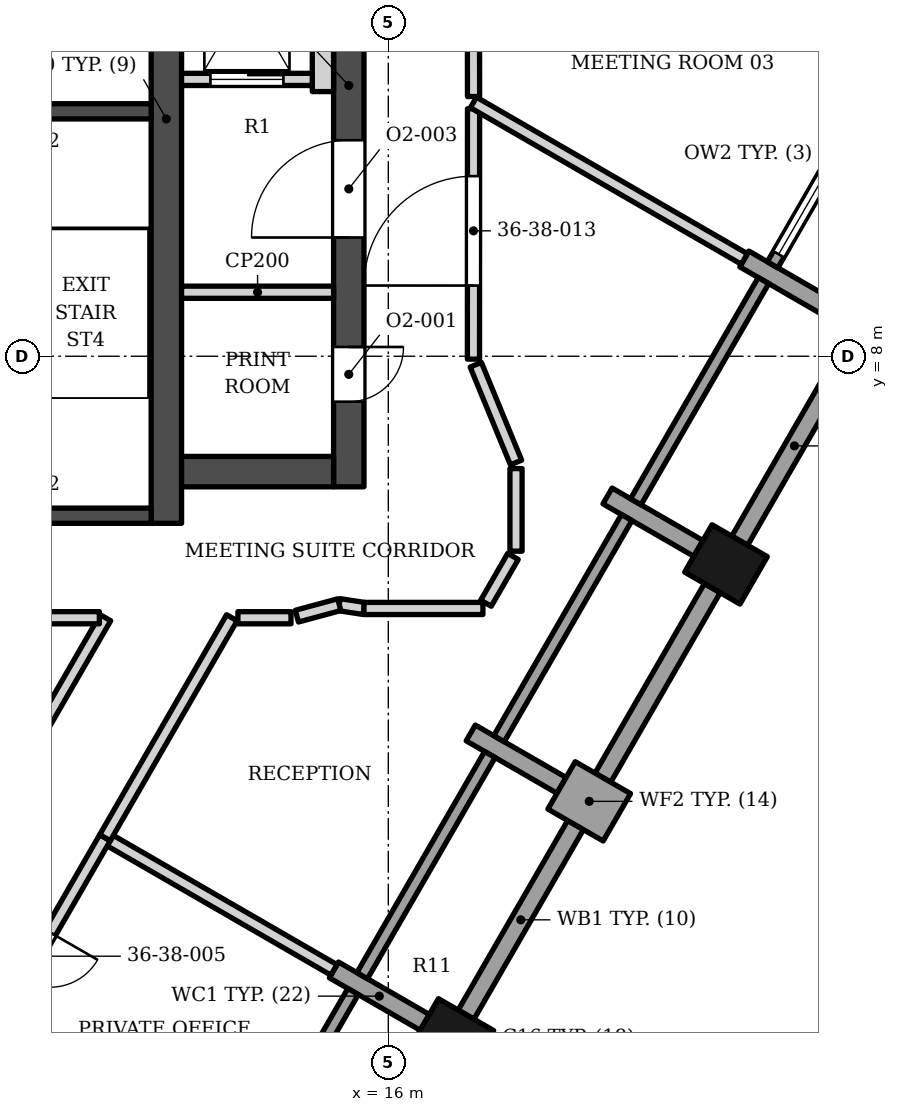
"""IFC4 building model, lengths in metres.
Left out: names, types, materials, properties, quantities, classifications, styles, units other than length and angle.
Written with IfcOpenShell. Run it as: python <this file> out.ifc"""

import sys

from ifc_helpers import new_model, si_unit, direction, frame, frame_2d, origin, origin_2d, place, context, subcontext, project, spatial, rectangle, extrude, element, fill, save


model = new_model("IFC4")
c1 = context("Model", 3, precision=1e-05, world=origin(), true_north=direction((0.0, 1.0)))
c2 = subcontext(c1, "Body", "Model", "MODEL_VIEW")
j1 = project(units=[si_unit("LENGTHUNIT", "METRE"), si_unit("PLANEANGLEUNIT", "RADIAN")], contexts=[c1])
p1 = place(None, origin())
s1 = spatial("IfcSite", under=j1, at=p1, CompositionType="ELEMENT")
p2 = place(p1, origin())
s2 = spatial("IfcBuilding", under=s1, at=p2, CompositionType="ELEMENT")
p3 = place(p2, frame((0.0, 0.0, 156.3)))
s3 = spatial("IfcBuildingStorey", under=s2, at=p3, CompositionType="ELEMENT", Elevation=156.3)
p4 = place(p3, frame((12.35, 5.253, 0.0), z_axis=(0.0, 0.0, 1.0), x_axis=(0.0, 1.0, 0.0)))
e1 = element("IfcWall", 1, at=p4, inside=s3, PredefinedType="SHEAR", context=c2, shape_type="SweptSolid", body=[
    extrude(rectangle(XDim=13.3, YDim=0.5, at=frame_2d((6.65, 0.0))), origin(), (0.0, 0.0, 1.0), 3.9),
])
for number, where, z_axis, x_axis in (
    (2, (8.35, 12.028, 0.0), (0.0, 0.0, 1.0), (1.0, 0.0, 0.0)),
    (3, (8.35, 5.378, 0.0), (0.0, 0.0, 1.0), (1.0, 0.0, 0.0)),
):
    element("IfcWall", number, at=place(p3, frame(where, z_axis=z_axis, x_axis=x_axis)), inside=s3, PredefinedType="SHEAR", context=c2, shape_type="SweptSolid", body=[
        extrude(rectangle(XDim=3.75, YDim=0.25, at=frame_2d((1.875, 0.0))), origin(), (0.0, 0.0, 1.0), 3.9),
    ])
p5 = place(p3, frame((12.6, 6.103, 0.0), z_axis=(0.0, 0.0, 1.0), x_axis=(1.0, 0.0, 0.0)))
e4 = element("IfcWall", 4, at=p5, inside=s3, PredefinedType="SHEAR", context=c2, shape_type="SweptSolid", body=[
    extrude(rectangle(XDim=2.5, YDim=0.5, at=frame_2d((1.25, 0.0))), origin(), (0.0, 0.0, 1.0), 3.9),
])
p6 = place(p3, frame((15.35, 5.853, 0.0), z_axis=(0.0, 0.0, 1.0), x_axis=(0.0, 1.0, 0.0)))
e5 = element("IfcWall", 5, at=p6, inside=s3, PredefinedType="SHEAR", context=c2, shape_type="SweptSolid", body=[
    extrude(rectangle(XDim=13.2, YDim=0.5, at=frame_2d((6.6, 0.0))), origin(), (0.0, 0.0, 1.0), 3.9),
])
p7 = place(p6, frame((4.1, 0.0, 0.0)))
e6 = element("IfcOpeningElement", 6, at=p7, cuts=e5, PredefinedType="OPENING", context=c2, shape_type="SweptSolid", body=[
    extrude(rectangle(XDim=1.6, YDim=2.1, at=frame_2d((0.8, 1.05))), frame((0.0, 0.26, 0.0), z_axis=(0.0, -1.0, 0.0), x_axis=(1.0, 0.0, 0.0)), (0.0, 0.0, 1.0), 0.52),
])
p8 = place(p6, frame((1.4, 0.0, 0.0)))
e7 = element("IfcOpeningElement", 7, at=p8, cuts=e5, PredefinedType="OPENING", context=c2, shape_type="SweptSolid", body=[
    extrude(rectangle(XDim=0.9, YDim=2.1, at=frame_2d((0.45, 1.05))), frame((0.0, 0.26, 0.0), z_axis=(0.0, -1.0, 0.0), x_axis=(1.0, 0.0, 0.0)), (0.0, 0.0, 1.0), 0.52),
])
p9 = place(p6, frame((10.15, 0.0, 0.0)))
e8 = element("IfcOpeningElement", 8, at=p9, cuts=e5, PredefinedType="OPENING", context=c2, shape_type="SweptSolid", body=[
    extrude(rectangle(XDim=0.9, YDim=2.1, at=frame_2d((0.45, 1.05))), frame((0.0, 0.26, 0.0), z_axis=(0.0, -1.0, 0.0), x_axis=(1.0, 0.0, 0.0)), (0.0, 0.0, 1.0), 0.52),
])
for number, where, z_axis, x_axis in (
    (9, (17.054, -3.217, 0.0), (0.0, 0.0, 1.0), (0.5, 0.866, 0.0)),
    (10, (21.554, 4.577, 0.0), (0.0, 0.0, 1.0), (0.5, 0.866, 0.0)),
):
    element("IfcColumn", number, at=place(p3, frame(where, z_axis=z_axis, x_axis=x_axis)), inside=s3, PredefinedType="COLUMN", context=c2, shape_type="SweptSolid", body=[
        extrude(rectangle(XDim=0.9, YDim=1.05, at=origin_2d()), origin(), (0.0, 0.0, 1.0), 3.9),
    ])
p10 = place(p3, frame((16.599, -2.954, 0.0), z_axis=(0.0, 0.0, 1.0), x_axis=(-0.86597814115, 0.500081852351, 0.0)))
e11 = element("IfcWall", 11, at=p10, inside=s3, PredefinedType="SOLIDWALL", context=c2, shape_type="SweptSolid", body=[
    extrude(rectangle(XDim=1.725, YDim=0.3, at=frame_2d((0.862, 0.0))), origin(), (0.0, 0.0, 1.0), 3.0),
])
p11 = place(p3, frame((19.759, 0.418, 0.0), z_axis=(0.0, 0.0, 1.0), x_axis=(-0.86592997719, 0.500165247297, 0.0)))
e12 = element("IfcWall", 12, at=p11, inside=s3, PredefinedType="SOLIDWALL", context=c2, shape_type="SweptSolid", body=[
    extrude(rectangle(XDim=1.05, YDim=0.9, at=frame_2d((0.525, 0.0))), origin(), (0.0, 0.0, 1.0), 3.0),
])
p12 = place(p3, frame((18.85, 0.943, 0.0), z_axis=(0.0, 0.0, 1.0), x_axis=(-0.866074815912, 0.499914405916, 0.0)))
e13 = element("IfcWall", 13, at=p12, inside=s3, PredefinedType="SOLIDWALL", context=c2, shape_type="SweptSolid", body=[
    extrude(rectangle(XDim=1.725, YDim=0.3, at=frame_2d((0.862, 0.0))), origin(), (0.0, 0.0, 1.0), 3.0),
])
p13 = place(p3, frame((21.1, 4.84, 0.0), z_axis=(0.0, 0.0, 1.0), x_axis=(-0.866013532718, 0.500020560727, 0.0)))
e14 = element("IfcWall", 14, at=p13, inside=s3, PredefinedType="SOLIDWALL", context=c2, shape_type="SweptSolid", body=[
    extrude(rectangle(XDim=1.725, YDim=0.3, at=frame_2d((0.863, 0.0))), origin(), (0.0, 0.0, 1.0), 2.95),
])
p14 = place(p3, frame((23.35, 8.737, 0.0), z_axis=(0.0, 0.0, 1.0), x_axis=(-0.866013532718, 0.500020560727, 0.0)))
e15 = element("IfcWall", 15, at=p14, inside=s3, PredefinedType="SOLIDWALL", context=c2, shape_type="SweptSolid", body=[
    extrude(rectangle(XDim=1.725, YDim=0.3, at=frame_2d((0.863, 0.0))), origin(), (0.0, 0.0, 1.0), 3.0),
])
p15 = place(p3, frame((13.32, -6.084, 0.0), z_axis=(0.0, 0.0, 1.0), x_axis=(0.500027713859, 0.866009402589, 0.0)))
e16 = element("IfcWall", 16, at=p15, inside=s3, PredefinedType="ELEMENTEDWALL", context=c2, shape_type="SweptSolid", body=[
    extrude(rectangle(XDim=4.2, YDim=0.2, at=frame_2d((2.1, 0.0))), origin(), (0.0, 0.0, 1.0), 3.0),
])
p16 = place(p3, frame((17.279, -2.827, 0.0), z_axis=(0.0, 0.0, 1.0), x_axis=(0.500012057535, 0.866018442252, 0.0)))
e17 = element("IfcWall", 17, at=p16, inside=s3, PredefinedType="SOLIDWALL", context=c2, shape_type="SweptSolid", body=[
    extrude(rectangle(XDim=3.6, YDim=0.3, at=frame_2d((1.8, 0.0))), origin(), (0.0, 0.0, 1.0), 3.0),
])
p17 = place(p3, frame((15.57, -2.187, 0.0), z_axis=(0.0, 0.0, 1.0), x_axis=(0.500002543286, 0.866023935413, 0.0)))
e18 = element("IfcWall", 18, at=p17, inside=s3, PredefinedType="ELEMENTEDWALL", context=c2, shape_type="SweptSolid", body=[
    extrude(rectangle(XDim=4.2, YDim=0.2, at=frame_2d((2.1, 0.0))), origin(), (0.0, 0.0, 1.0), 3.0),
])
p18 = place(p3, frame((19.529, 1.07, 0.0), z_axis=(0.0, 0.0, 1.0), x_axis=(0.50001992892, 0.866013897511, 0.0)))
e19 = element("IfcWall", 19, at=p18, inside=s3, PredefinedType="SOLIDWALL", context=c2, shape_type="SweptSolid", body=[
    extrude(rectangle(XDim=3.599, YDim=0.3, at=frame_2d((1.8, 0.0))), origin(), (0.0, 0.0, 1.0), 3.0),
])
p19 = place(p3, frame((17.82, 1.71, 0.0), z_axis=(0.0, 0.0, 1.0), x_axis=(0.500027713859, 0.866009402589, 0.0)))
e20 = element("IfcWall", 20, at=p19, inside=s3, PredefinedType="ELEMENTEDWALL", context=c2, shape_type="SweptSolid", body=[
    extrude(rectangle(XDim=4.2, YDim=0.2, at=frame_2d((2.1, 0.0))), origin(), (0.0, 0.0, 1.0), 2.95),
])
p20 = place(p3, frame((21.779, 4.967, 0.0), z_axis=(0.0, 0.0, 1.0), x_axis=(0.500012057535, 0.866018442252, 0.0)))
e21 = element("IfcWall", 21, at=p20, inside=s3, PredefinedType="SOLIDWALL", context=c2, shape_type="SweptSolid", body=[
    extrude(rectangle(XDim=3.6, YDim=0.3, at=frame_2d((1.8, 0.0))), origin(), (0.0, 0.0, 1.0), 3.0),
])
p21 = place(p3, frame((20.07, 5.607, 0.0), z_axis=(0.0, 0.0, 1.0), x_axis=(0.500002543286, 0.866023935413, 0.0)))
e22 = element("IfcWall", 22, at=p21, inside=s3, PredefinedType="ELEMENTEDWALL", context=c2, shape_type="SweptSolid", body=[
    extrude(rectangle(XDim=4.2, YDim=0.2, at=frame_2d((2.1, 0.0))), origin(), (0.0, 0.0, 1.0), 3.0),
])
p22 = place(p3, frame((22.32, 9.504, 0.0), z_axis=(0.0, 0.0, 1.0), x_axis=(0.500027713859, 0.866009402589, 0.0)))
e23 = element("IfcWall", 23, at=p22, inside=s3, PredefinedType="ELEMENTEDWALL", context=c2, shape_type="SweptSolid", body=[
    extrude(rectangle(XDim=4.2, YDim=0.2, at=frame_2d((2.1, 0.0))), origin(), (0.0, 0.0, 1.0), 3.0),
])
p23 = place(p22, frame((0.2, 0.0, 0.45)))
e24 = element("IfcOpeningElement", 24, at=p23, cuts=e23, PredefinedType="OPENING", context=c2, shape_type="SweptSolid", body=[
    extrude(rectangle(XDim=3.8, YDim=2.25, at=frame_2d((1.9, 1.125))), frame((0.0, 0.11, 0.0), z_axis=(0.0, -1.0, 0.0), x_axis=(1.0, 0.0, 0.0)), (0.0, 0.0, 1.0), 0.22),
])
p24 = place(p3, frame((12.6, 9.052, 0.0), z_axis=(0.0, 0.0, 1.0), x_axis=(1.0, 0.0, 0.0)))
e25 = element("IfcWall", 25, at=p24, inside=s3, PredefinedType="PARTITIONING", context=c2, shape_type="SweptSolid", body=[
    extrude(rectangle(XDim=2.5, YDim=0.2, at=frame_2d((1.25, 0.0))), origin(), (0.0, 0.0, 1.0), 3.73),
])
p25 = place(p3, frame((14.925, 12.353, 0.0), z_axis=(0.0, 0.0, 1.0), x_axis=(0.0, 1.0, 0.0)))
e26 = element("IfcWall", 26, at=p25, inside=s3, PredefinedType="SOLIDWALL", context=c2, shape_type="SweptSolid", body=[
    extrude(rectangle(XDim=3.6, YDim=0.35, at=frame_2d((1.8, 0.0))), origin(), (0.0, 0.0, 1.0), 3.73),
])
p26 = place(p3, frame((12.6, 12.552, 0.0), z_axis=(0.0, 0.0, 1.0), x_axis=(1.0, 0.0, 0.0)))
e27 = element("IfcWall", 27, at=p26, inside=s3, PredefinedType="SOLIDWALL", context=c2, shape_type="SweptSolid", body=[
    extrude(rectangle(XDim=2.15, YDim=0.2, at=frame_2d((1.075, 0.0))), origin(), (0.0, 0.0, 1.0), 3.73),
])
p27 = place(p26, frame((0.475, 0.0, 0.0)))
e28 = element("IfcOpeningElement", 28, at=p27, cuts=e27, PredefinedType="OPENING", context=c2, shape_type="SweptSolid", body=[
    extrude(rectangle(XDim=1.2, YDim=2.1, at=frame_2d((0.6, 1.05))), frame((0.0, 0.11, 0.0), z_axis=(0.0, -1.0, 0.0), x_axis=(1.0, 0.0, 0.0)), (0.0, 0.0, 1.0), 0.22),
])
p28 = place(p3, frame((6.984, -3.855, 0.0), z_axis=(0.0, 0.0, 1.0), x_axis=(0.500195547237, 0.865912475095, 0.0)))
e29 = element("IfcWall", 29, at=p28, inside=s3, PredefinedType="PARTITIONING", context=c2, shape_type="SweptSolid", body=[
    extrude(rectangle(XDim=8.725, YDim=0.2, at=frame_2d((4.363, 0.0))), origin(), (0.0, 0.0, 1.0), 3.052),
])
p29 = place(p28, frame((3.861, 0.0, 0.0)))
e30 = element("IfcOpeningElement", 30, at=p29, cuts=e29, PredefinedType="OPENING", context=c2, shape_type="SweptSolid", body=[
    extrude(rectangle(XDim=1.0, YDim=2.1, at=frame_2d((0.5, 1.05))), frame((0.0, 0.11, 0.0), z_axis=(0.0, -1.0, 0.0), x_axis=(1.0, 0.0, 0.0)), (0.0, 0.0, 1.0), 0.22),
])
p30 = place(p3, frame((11.427, 0.035, 0.0), z_axis=(0.0, 0.0, 1.0), x_axis=(0.865857330643, -0.500290998291, 0.0)))
e31 = element("IfcWall", 31, at=p30, inside=s3, PredefinedType="PARTITIONING", context=c2, shape_type="SweptSolid", body=[
    extrude(rectangle(XDim=4.25, YDim=0.2, at=frame_2d((2.125, 0.0))), origin(), (0.0, 0.0, 1.0), 3.052),
])
p31 = place(p3, frame((9.09, -3.815, 0.0), z_axis=(0.0, 0.0, 1.0), x_axis=(0.499972939495, 0.866041026611, 0.0)))
e32 = element("IfcWall", 32, at=p31, inside=s3, PredefinedType="PARTITIONING", context=c2, shape_type="SweptSolid", body=[
    extrude(rectangle(XDim=4.5, YDim=0.2, at=frame_2d((2.25, 0.0))), origin(), (0.0, 0.0, 1.0), 3.052),
])
p32 = place(p31, frame((1.8, 0.0, 0.0)))
e33 = element("IfcOpeningElement", 33, at=p32, cuts=e32, PredefinedType="OPENING", context=c2, shape_type="SweptSolid", body=[
    extrude(rectangle(XDim=0.9, YDim=2.1, at=frame_2d((0.45, 1.05))), frame((0.0, 0.11, 0.0), z_axis=(0.0, -1.0, 0.0), x_axis=(1.0, 0.0, 0.0)), (0.0, 0.0, 1.0), 0.22),
])
p33 = place(p3, frame((6.0, 3.7, 0.0), z_axis=(0.0, 0.0, 1.0), x_axis=(1.0, 0.0, 0.0)))
e34 = element("IfcWall", 34, at=p33, inside=s3, PredefinedType="PARTITIONING", context=c2, shape_type="SweptSolid", body=[
    extrude(rectangle(XDim=5.248, YDim=0.2, at=frame_2d((2.624, 0.0))), origin(), (0.0, 0.0, 1.0), 3.332),
])
p34 = place(p3, frame((11.341, 0.083, 0.0), z_axis=(0.0, 0.0, 1.0), x_axis=(0.499673523279, 0.866213813174, 0.0)))
e35 = element("IfcWall", 35, at=p34, inside=s3, PredefinedType="PARTITIONING", context=c2, shape_type="SweptSolid", body=[
    extrude(rectangle(XDim=4.176, YDim=0.2, at=frame_2d((2.088, 0.0))), origin(), (0.0, 0.0, 1.0), 3.052),
])
p35 = place(p3, frame((13.527, 3.699, 0.0), z_axis=(0.0, 0.0, 1.0), x_axis=(1.0, 0.0, 0.0)))
e36 = element("IfcWall", 36, at=p35, inside=s3, PredefinedType="PARTITIONING", context=c2, shape_type="SweptSolid", body=[
    extrude(rectangle(XDim=0.873, YDim=0.2, at=frame_2d((0.437, 0.0))), origin(), (0.0, 0.0, 1.0), 3.052),
])
p36 = place(p3, frame((15.193, 3.915, 0.0), z_axis=(0.0, 0.0, 1.0), x_axis=(0.988399116328, -0.15187885581, 0.0)))
e37 = element("IfcWall", 37, at=p36, inside=s3, PredefinedType="PARTITIONING", context=c2, shape_type="SweptSolid", body=[
    extrude(rectangle(XDim=0.412, YDim=0.2, at=frame_2d((0.206, 0.0))), origin(), (0.0, 0.0, 1.0), 3.73),
])
p37 = place(p3, frame((15.6, 3.852, 0.0), z_axis=(0.0, 0.0, 1.0), x_axis=(1.0, 0.0, 0.0)))
e38 = element("IfcWall", 38, at=p37, inside=s3, PredefinedType="PARTITIONING", context=c2, shape_type="SweptSolid", body=[
    extrude(rectangle(XDim=1.956, YDim=0.2, at=frame_2d((0.978, 0.0))), origin(), (0.0, 0.0, 1.0), 3.73),
])
p38 = place(p3, frame((14.497, 3.726, 0.0), z_axis=(0.0, 0.0, 1.0), x_axis=(0.965137431954, 0.26174364833, 0.0)))
e39 = element("IfcWall", 39, at=p38, inside=s3, PredefinedType="PARTITIONING", context=c2, shape_type="SweptSolid", body=[
    extrude(rectangle(XDim=0.722, YDim=0.2, at=frame_2d((0.361, 0.0))), origin(), (0.0, 0.0, 1.0), 3.73),
])
p39 = place(p3, frame((17.606, 3.939, 0.0), z_axis=(0.0, 0.0, 1.0), x_axis=(0.500071473339, 0.8659841347, 0.0)))
e40 = element("IfcWall", 40, at=p39, inside=s3, PredefinedType="PARTITIONING", context=c2, shape_type="SweptSolid", body=[
    extrude(rectangle(XDim=0.888, YDim=0.2, at=frame_2d((0.444, 0.0))), origin(), (0.0, 0.0, 1.0), 3.332),
])
p40 = place(p3, frame((18.101, 4.794, 0.0), z_axis=(0.0, 0.0, 1.0), x_axis=(0.0, 1.0, 0.0)))
e41 = element("IfcWall", 41, at=p40, inside=s3, PredefinedType="PARTITIONING", context=c2, shape_type="SweptSolid", body=[
    extrude(rectangle(XDim=1.358, YDim=0.2, at=frame_2d((0.679, 0.0))), origin(), (0.0, 0.0, 1.0), 2.95),
])
p41 = place(p3, frame((17.439, 7.86, 0.0), z_axis=(0.0, 0.0, 1.0), x_axis=(0.380742741509, -0.924681007044, 0.0)))
e42 = element("IfcWall", 42, at=p41, inside=s3, PredefinedType="PARTITIONING", context=c2, shape_type="SweptSolid", body=[
    extrude(rectangle(XDim=1.738, YDim=0.2, at=frame_2d((0.869, 0.0))), origin(), (0.0, 0.0, 1.0), 3.73),
])
p42 = place(p3, frame((17.4, 7.953, 0.0), z_axis=(0.0, 0.0, 1.0), x_axis=(0.000414986922, 0.999999913893, 0.0)))
e43 = element("IfcWall", 43, at=p42, inside=s3, PredefinedType="PARTITIONING", context=c2, shape_type="SweptSolid", body=[
    extrude(rectangle(XDim=4.118, YDim=0.2, at=frame_2d((2.059, 0.0))), origin(), (0.0, 0.0, 1.0), 3.73),
])
p43 = place(p42, frame((1.209, 0.0, 0.0)))
e44 = element("IfcOpeningElement", 44, at=p43, cuts=e43, PredefinedType="OPENING", context=c2, shape_type="SweptSolid", body=[
    extrude(rectangle(XDim=1.8, YDim=2.4, at=frame_2d((0.9, 1.2))), frame((0.0, 0.11, 0.0), z_axis=(0.0, -1.0, 0.0), x_axis=(1.0, 0.0, 0.0)), (0.0, 0.0, 1.0), 0.22),
])
p44 = place(p3, frame((17.401, 12.174, 0.0), z_axis=(0.0, 0.0, 1.0), x_axis=(0.865871011045, -0.500267320772, 0.0)))
e45 = element("IfcWall", 45, at=p44, inside=s3, PredefinedType="PARTITIONING", context=c2, shape_type="SweptSolid", body=[
    extrude(rectangle(XDim=5.145, YDim=0.2, at=frame_2d((2.573, 0.0))), origin(), (0.0, 0.0, 1.0), 3.73),
])
p45 = place(p3, frame((17.401, 13.352, 0.0), z_axis=(0.0, 0.0, 1.0), x_axis=(0.001128922288, -0.999999362767, 0.0)))
e46 = element("IfcWall", 46, at=p45, inside=s3, PredefinedType="PARTITIONING", context=c2, shape_type="SweptSolid", body=[
    extrude(rectangle(XDim=1.081, YDim=0.2, at=frame_2d((0.541, 0.0))), origin(), (0.0, 0.0, 1.0), 3.73),
])
p46 = place(p23, origin())
e47 = element("IfcWindow", 47, at=p46, inside=s3, PartitioningType="SINGLE_PANEL", PredefinedType="WINDOW", context=c2, shape_type="SweptSolid", body=[
    extrude(rectangle(XDim=3.8, YDim=2.25, at=frame_2d((1.9, 1.125))), frame((0.0, 0.03, 0.0), z_axis=(0.0, -1.0, 0.0), x_axis=(1.0, 0.0, 0.0)), (0.0, 0.0, 1.0), 0.06),
])
fill(e24, e47)
p47 = place(p27, origin())
e48 = element("IfcDoor", 48, at=p47, inside=s3, OperationType="DOUBLE_DOOR_SLIDING", PredefinedType="DOOR", context=c2, shape_type="SweptSolid", body=[
    extrude(rectangle(XDim=1.2, YDim=2.1, at=frame_2d((0.6, 1.05))), frame((0.0, 0.025, 0.0), z_axis=(0.0, -1.0, 0.0), x_axis=(1.0, 0.0, 0.0)), (0.0, 0.0, 1.0), 0.05),
])
fill(e28, e48)
p48 = place(p7, origin())
e49 = element("IfcDoor", 49, at=p48, inside=s3, OperationType="DOUBLE_DOOR_SINGLE_SWING", PredefinedType="DOOR", context=c2, shape_type="SweptSolid", body=[
    extrude(rectangle(XDim=1.6, YDim=2.1, at=frame_2d((0.8, 1.05))), frame((0.0, 0.025, 0.0), z_axis=(0.0, -1.0, 0.0), x_axis=(1.0, 0.0, 0.0)), (0.0, 0.0, 1.0), 0.05),
])
fill(e6, e49)
p49 = place(p8, origin())
e50 = element("IfcDoor", 50, at=p49, inside=s3, OperationType="SINGLE_SWING_RIGHT", PredefinedType="DOOR", context=c2, shape_type="SweptSolid", body=[
    extrude(rectangle(XDim=0.9, YDim=2.1, at=frame_2d((0.45, 1.05))), frame((0.0, 0.025, 0.0), z_axis=(0.0, -1.0, 0.0), x_axis=(1.0, 0.0, 0.0)), (0.0, 0.0, 1.0), 0.05),
])
fill(e7, e50)
p50 = place(p43, origin())
e51 = element("IfcDoor", 51, at=p50, inside=s3, OperationType="DOUBLE_DOOR_SINGLE_SWING", PredefinedType="DOOR", context=c2, shape_type="SweptSolid", body=[
    extrude(rectangle(XDim=1.8, YDim=2.4, at=frame_2d((0.9, 1.2))), frame((0.0, 0.025, 0.0), z_axis=(0.0, -1.0, 0.0), x_axis=(1.0, 0.0, 0.0)), (0.0, 0.0, 1.0), 0.05),
])
fill(e44, e51)
save(model, sys.argv[1])
